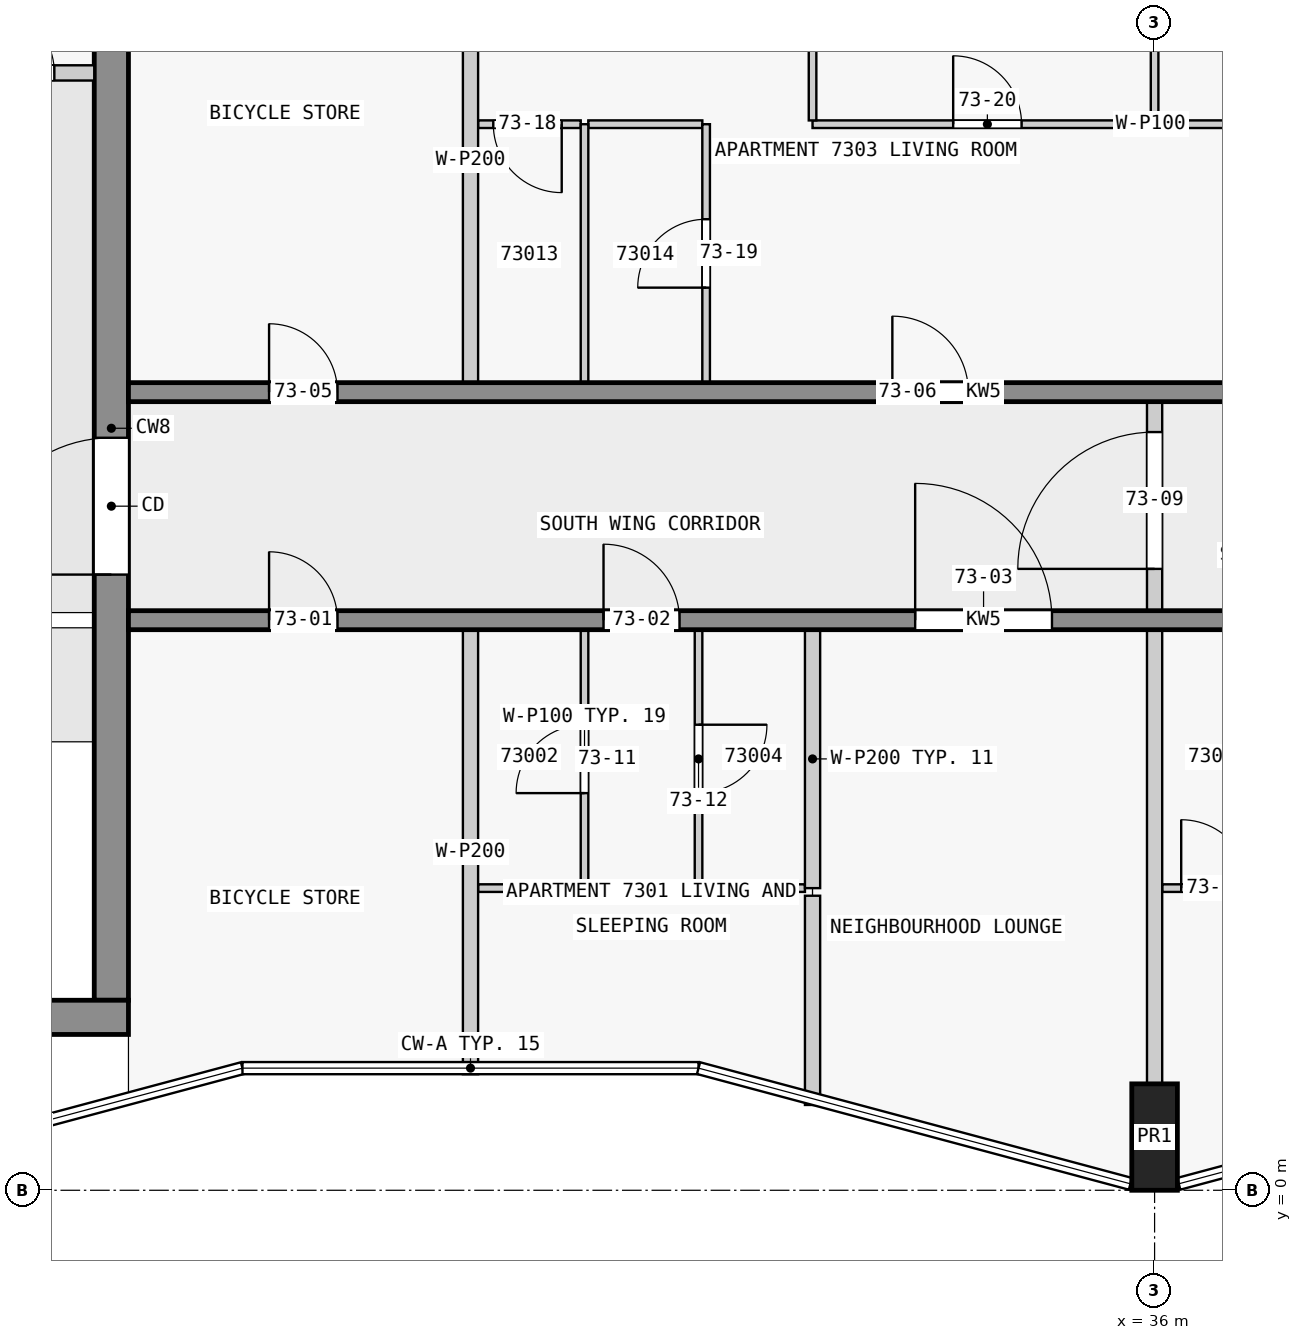
"""IFC4 building model, lengths in metres.
Left out: names, types, materials, properties, quantities, classifications, styles, units other than length and angle.
Written with IfcOpenShell. Run it as: python <this file> out.ifc"""

import sys

from ifc_helpers import new_model, si_unit, direction, frame, frame_2d, origin, origin_2d, place, context, subcontext, project, spatial, rectangle, extrude, element, fill, save


model = new_model("IFC4")
c1 = context("Model", 3, precision=1e-05, world=origin(), true_north=direction((0.0, 1.0)))
c2 = subcontext(c1, "Body", "Model", "MODEL_VIEW")
j1 = project(units=[si_unit("LENGTHUNIT", "METRE"), si_unit("PLANEANGLEUNIT", "RADIAN")], contexts=[c1])
p1 = place(None, origin())
s1 = spatial("IfcSite", under=j1, at=p1, CompositionType="ELEMENT")
p2 = place(p1, origin())
s2 = spatial("IfcBuilding", under=s1, at=p2, CompositionType="ELEMENT")
p3 = place(p2, frame((0.0, 0.0, 277.4)))
s3 = spatial("IfcBuildingStorey", under=s2, at=p3, CompositionType="ELEMENT", Elevation=277.4)
p4 = place(p3, frame((36.0, 0.7, 0.0), z_axis=(0.0, 0.0, 1.0), x_axis=(1.0, 0.0, 0.0)))
e1 = element("IfcColumn", 1, at=p4, inside=s3, PredefinedType="COLUMN", context=c2, shape_type="SweptSolid", body=[
    extrude(rectangle(XDim=0.6, YDim=1.4, at=origin_2d()), origin(), (0.0, 0.0, 1.0), 3.5),
])
p5 = place(p3, frame((1.85, 2.275, 0.0), z_axis=(0.0, 0.0, 1.0), x_axis=(1.0, 0.0, 0.0)))
e2 = element("IfcWall", 2, at=p5, inside=s3, PredefinedType="SHEAR", context=c2, shape_type="SweptSolid", body=[
    extrude(rectangle(XDim=20.65, YDim=0.45, at=frame_2d((10.325, 0.0))), origin(), (0.0, 0.0, 1.0), 3.25),
])
p6 = place(p3, frame((22.275, 2.5, 0.0), z_axis=(0.0, 0.0, 1.0), x_axis=(0.0, 1.0, 0.0)))
e3 = element("IfcWall", 3, at=p6, inside=s3, PredefinedType="SHEAR", context=c2, shape_type="SweptSolid", body=[
    extrude(rectangle(XDim=15.05, YDim=0.45, at=frame_2d((7.525, 0.0))), origin(), (0.0, 0.0, 1.0), 3.25),
])
p7 = place(p6, frame((5.6, 0.0, 0.0)))
e4 = element("IfcOpeningElement", 4, at=p7, cuts=e3, PredefinedType="OPENING", context=c2, shape_type="SweptSolid", body=[
    extrude(rectangle(XDim=1.8, YDim=2.1, at=frame_2d((0.9, 1.05))), frame((0.0, 0.235, 0.0), z_axis=(0.0, -1.0, 0.0), x_axis=(1.0, 0.0, 0.0)), (0.0, 0.0, 1.0), 0.47),
])
p8 = place(p3, frame((22.5, 7.5, 0.0), z_axis=(0.0, 0.0, 1.0), x_axis=(1.0, 0.0, 0.0)))
e5 = element("IfcWall", 5, at=p8, inside=s3, PredefinedType="SHEAR", context=c2, shape_type="SweptSolid", body=[
    extrude(rectangle(XDim=22.5, YDim=0.25, at=frame_2d((11.25, 0.0))), origin(), (0.0, 0.0, 1.0), 3.25),
])
p9 = place(p8, frame((1.85, 0.0, 0.0)))
e6 = element("IfcOpeningElement", 6, at=p9, cuts=e5, PredefinedType="OPENING", context=c2, shape_type="SweptSolid", body=[
    extrude(rectangle(XDim=0.9, YDim=2.1, at=frame_2d((0.45, 1.05))), frame((0.0, 0.135, 0.0), z_axis=(0.0, -1.0, 0.0), x_axis=(1.0, 0.0, 0.0)), (0.0, 0.0, 1.0), 0.27),
])
p10 = place(p8, frame((6.25, 0.0, 0.0)))
e7 = element("IfcOpeningElement", 7, at=p10, cuts=e5, PredefinedType="OPENING", context=c2, shape_type="SweptSolid", body=[
    extrude(rectangle(XDim=1.0, YDim=2.1, at=frame_2d((0.5, 1.05))), frame((0.0, 0.135, 0.0), z_axis=(0.0, -1.0, 0.0), x_axis=(1.0, 0.0, 0.0)), (0.0, 0.0, 1.0), 0.27),
])
p11 = place(p8, frame((10.35, 0.0, 0.0)))
e8 = element("IfcOpeningElement", 8, at=p11, cuts=e5, PredefinedType="OPENING", context=c2, shape_type="SweptSolid", body=[
    extrude(rectangle(XDim=1.8, YDim=2.1, at=frame_2d((0.9, 1.05))), frame((0.0, 0.135, 0.0), z_axis=(0.0, -1.0, 0.0), x_axis=(1.0, 0.0, 0.0)), (0.0, 0.0, 1.0), 0.27),
])
p12 = place(p8, frame((16.85, 0.0, 0.0)))
e9 = element("IfcOpeningElement", 9, at=p12, cuts=e5, PredefinedType="OPENING", context=c2, shape_type="SweptSolid", body=[
    extrude(rectangle(XDim=1.0, YDim=2.1, at=frame_2d((0.5, 1.05))), frame((0.0, 0.135, 0.0), z_axis=(0.0, -1.0, 0.0), x_axis=(1.0, 0.0, 0.0)), (0.0, 0.0, 1.0), 0.27),
])
p13 = place(p3, frame((22.5, 10.5, 0.0), z_axis=(0.0, 0.0, 1.0), x_axis=(1.0, 0.0, 0.0)))
e10 = element("IfcWall", 10, at=p13, inside=s3, PredefinedType="SHEAR", context=c2, shape_type="SweptSolid", body=[
    extrude(rectangle(XDim=22.5, YDim=0.25, at=frame_2d((11.25, 0.0))), origin(), (0.0, 0.0, 1.0), 3.25),
])
p14 = place(p13, frame((1.85, 0.0, 0.0)))
e11 = element("IfcOpeningElement", 11, at=p14, cuts=e10, PredefinedType="OPENING", context=c2, shape_type="SweptSolid", body=[
    extrude(rectangle(XDim=0.9, YDim=2.1, at=frame_2d((0.45, 1.05))), frame((0.0, 0.135, 0.0), z_axis=(0.0, -1.0, 0.0), x_axis=(1.0, 0.0, 0.0)), (0.0, 0.0, 1.0), 0.27),
])
p15 = place(p13, frame((10.05, 0.0, 0.0)))
e12 = element("IfcOpeningElement", 12, at=p15, cuts=e10, PredefinedType="OPENING", context=c2, shape_type="SweptSolid", body=[
    extrude(rectangle(XDim=1.0, YDim=2.1, at=frame_2d((0.5, 1.05))), frame((0.0, 0.135, 0.0), z_axis=(0.0, -1.0, 0.0), x_axis=(1.0, 0.0, 0.0)), (0.0, 0.0, 1.0), 0.27),
])
p16 = place(p13, frame((18.75, 0.0, 0.0)))
e13 = element("IfcOpeningElement", 13, at=p16, cuts=e10, PredefinedType="OPENING", context=c2, shape_type="SweptSolid", body=[
    extrude(rectangle(XDim=0.9, YDim=2.1, at=frame_2d((0.45, 1.05))), frame((0.0, 0.135, 0.0), z_axis=(0.0, -1.0, 0.0), x_axis=(1.0, 0.0, 0.0)), (0.0, 0.0, 1.0), 0.27),
])
p17 = place(p13, frame((20.95, 0.0, 0.0)))
e14 = element("IfcOpeningElement", 14, at=p17, cuts=e10, PredefinedType="OPENING", context=c2, shape_type="SweptSolid", body=[
    extrude(rectangle(XDim=1.0, YDim=2.1, at=frame_2d((0.5, 1.05))), frame((0.0, 0.135, 0.0), z_axis=(0.0, -1.0, 0.0), x_axis=(1.0, 0.0, 0.0)), (0.0, 0.0, 1.0), 0.27),
])
p18 = place(p3, frame((18.6, 14.7, 0.0), z_axis=(0.0, 0.0, 1.0), x_axis=(1.0, 0.0, 0.0)))
e15 = element("IfcWall", 15, at=p18, inside=s3, PredefinedType="PARTITIONING", context=c2, shape_type="SweptSolid", body=[
    extrude(rectangle(XDim=3.45, YDim=0.2, at=frame_2d((1.725, 0.0))), origin(), (0.0, 0.0, 1.0), 3.25),
])
p19 = place(p18, frame((0.3, 0.0, 0.0)))
e16 = element("IfcOpeningElement", 16, at=p19, cuts=e15, PredefinedType="OPENING", context=c2, shape_type="SweptSolid", body=[
    extrude(rectangle(XDim=0.9, YDim=2.1, at=frame_2d((0.45, 1.05))), frame((0.0, 0.11, 0.0), z_axis=(0.0, -1.0, 0.0), x_axis=(1.0, 0.0, 0.0)), (0.0, 0.0, 1.0), 0.22),
])
p20 = place(p18, frame((2.025, 0.0, 0.0)))
e17 = element("IfcOpeningElement", 17, at=p20, cuts=e15, PredefinedType="OPENING", context=c2, shape_type="SweptSolid", body=[
    extrude(rectangle(XDim=0.9, YDim=2.1, at=frame_2d((0.45, 1.05))), frame((0.0, 0.11, 0.0), z_axis=(0.0, -1.0, 0.0), x_axis=(1.0, 0.0, 0.0)), (0.0, 0.0, 1.0), 0.22),
])
for number, where, z_axis, x_axis in (
    (18, (27.1, 3.975, 0.0), (0.0, 0.0, 1.0), (1.0, 0.0, 0.0)),
    (19, (30.05, 3.975, 0.0), (0.0, 0.0, 1.0), (1.0, 0.0, 0.0)),
):
    element("IfcWall", number, at=place(p3, frame(where, z_axis=z_axis, x_axis=x_axis)), inside=s3, PredefinedType="PARTITIONING", context=c2, shape_type="SweptSolid", body=[
        extrude(rectangle(XDim=1.35, YDim=0.1, at=frame_2d((0.675, 0.0))), origin(), (0.0, 0.0, 1.0), 3.25),
    ])
p21 = place(p3, frame((36.1, 3.975, 0.0), z_axis=(0.0, 0.0, 1.0), x_axis=(1.0, 0.0, 0.0)))
e20 = element("IfcWall", 20, at=p21, inside=s3, PredefinedType="PARTITIONING", context=c2, shape_type="SweptSolid", body=[
    extrude(rectangle(XDim=1.45, YDim=0.1, at=frame_2d((0.725, 0.0))), origin(), (0.0, 0.0, 1.0), 3.25),
])
p22 = place(p21, frame((0.25, 0.0, 0.0)))
e21 = element("IfcOpeningElement", 21, at=p22, cuts=e20, PredefinedType="OPENING", context=c2, shape_type="SweptSolid", body=[
    extrude(rectangle(XDim=0.9, YDim=2.1, at=frame_2d((0.45, 1.05))), frame((0.0, 0.06, 0.0), z_axis=(0.0, -1.0, 0.0), x_axis=(1.0, 0.0, 0.0)), (0.0, 0.0, 1.0), 0.12),
])
p23 = place(p3, frame((28.45, 14.025, 0.0), z_axis=(0.0, 0.0, 1.0), x_axis=(-1.0, 0.0, 0.0)))
e22 = element("IfcWall", 22, at=p23, inside=s3, PredefinedType="PARTITIONING", context=c2, shape_type="SweptSolid", body=[
    extrude(rectangle(XDim=1.35, YDim=0.1, at=frame_2d((0.675, 0.0))), origin(), (0.0, 0.0, 1.0), 3.25),
])
p24 = place(p23, frame((0.25, 0.0, 0.0)))
e23 = element("IfcOpeningElement", 23, at=p24, cuts=e22, PredefinedType="OPENING", context=c2, shape_type="SweptSolid", body=[
    extrude(rectangle(XDim=0.9, YDim=2.1, at=frame_2d((0.45, 1.05))), frame((0.0, 0.06, 0.0), z_axis=(0.0, -1.0, 0.0), x_axis=(1.0, 0.0, 0.0)), (0.0, 0.0, 1.0), 0.12),
])
p25 = place(p3, frame((30.05, 14.025, 0.0), z_axis=(0.0, 0.0, 1.0), x_axis=(-1.0, 0.0, 0.0)))
e24 = element("IfcWall", 24, at=p25, inside=s3, PredefinedType="PARTITIONING", context=c2, shape_type="SweptSolid", body=[
    extrude(rectangle(XDim=1.5, YDim=0.1, at=frame_2d((0.75, 0.0))), origin(), (0.0, 0.0, 1.0), 3.25),
])
p26 = place(p3, frame((31.5, 14.025, 0.0), z_axis=(0.0, 0.0, 1.0), x_axis=(1.0, 0.0, 0.0)))
e25 = element("IfcWall", 25, at=p26, inside=s3, PredefinedType="PARTITIONING", context=c2, shape_type="SweptSolid", body=[
    extrude(rectangle(XDim=8.9, YDim=0.1, at=frame_2d((4.45, 0.0))), origin(), (0.0, 0.0, 1.0), 3.25),
])
p27 = place(p26, frame((1.85, 0.0, 0.0)))
e26 = element("IfcOpeningElement", 26, at=p27, cuts=e25, PredefinedType="OPENING", context=c2, shape_type="SweptSolid", body=[
    extrude(rectangle(XDim=0.9, YDim=2.1, at=frame_2d((0.45, 1.05))), frame((0.0, 0.06, 0.0), z_axis=(0.0, -1.0, 0.0), x_axis=(1.0, 0.0, 0.0)), (0.0, 0.0, 1.0), 0.12),
])
p28 = place(p26, frame((6.25, 0.0, 0.0)))
e27 = element("IfcOpeningElement", 27, at=p28, cuts=e25, PredefinedType="OPENING", context=c2, shape_type="SweptSolid", body=[
    extrude(rectangle(XDim=0.9, YDim=2.1, at=frame_2d((0.45, 1.05))), frame((0.0, 0.06, 0.0), z_axis=(0.0, -1.0, 0.0), x_axis=(1.0, 0.0, 0.0)), (0.0, 0.0, 1.0), 0.12),
])
for number, where, z_axis, x_axis in (
    (28, (27.0, 1.527, 0.0), (0.0, 0.0, 1.0), (0.0, 1.0, 0.0)),
    (29, (27.0, 10.625, 0.0), (0.0, 0.0, 1.0), (0.0, 1.0, 0.0)),
):
    element("IfcWall", number, at=place(p3, frame(where, z_axis=z_axis, x_axis=x_axis)), inside=s3, PredefinedType="PARTITIONING", context=c2, shape_type="SweptSolid", body=[
        extrude(rectangle(XDim=5.848, YDim=0.2, at=frame_2d((2.924, 0.0))), origin(), (0.0, 0.0, 1.0), 3.25),
    ])
p29 = place(p3, frame((28.5, 3.975, 0.0), z_axis=(0.0, 0.0, 1.0), x_axis=(0.0, 1.0, 0.0)))
e30 = element("IfcWall", 30, at=p29, inside=s3, PredefinedType="PARTITIONING", context=c2, shape_type="SweptSolid", body=[
    extrude(rectangle(XDim=3.4, YDim=0.1, at=frame_2d((1.7, 0.0))), origin(), (0.0, 0.0, 1.0), 3.25),
])
p30 = place(p29, frame((1.25, 0.0, 0.0)))
e31 = element("IfcOpeningElement", 31, at=p30, cuts=e30, PredefinedType="OPENING", context=c2, shape_type="SweptSolid", body=[
    extrude(rectangle(XDim=0.9, YDim=2.1, at=frame_2d((0.45, 1.05))), frame((0.0, 0.06, 0.0), z_axis=(0.0, -1.0, 0.0), x_axis=(1.0, 0.0, 0.0)), (0.0, 0.0, 1.0), 0.12),
])
p31 = place(p3, frame((28.5, 10.625, 0.0), z_axis=(0.0, 0.0, 1.0), x_axis=(0.0, 1.0, 0.0)))
e32 = element("IfcWall", 32, at=p31, inside=s3, PredefinedType="PARTITIONING", context=c2, shape_type="SweptSolid", body=[
    extrude(rectangle(XDim=3.4, YDim=0.1, at=frame_2d((1.7, 0.0))), origin(), (0.0, 0.0, 1.0), 3.25),
])
p32 = place(p3, frame((30.0, 7.375, 0.0), z_axis=(0.0, 0.0, 1.0), x_axis=(0.0, -1.0, 0.0)))
e33 = element("IfcWall", 33, at=p32, inside=s3, PredefinedType="PARTITIONING", context=c2, shape_type="SweptSolid", body=[
    extrude(rectangle(XDim=3.4, YDim=0.1, at=frame_2d((1.7, 0.0))), origin(), (0.0, 0.0, 1.0), 3.25),
])
p33 = place(p32, frame((1.25, 0.0, 0.0)))
e34 = element("IfcOpeningElement", 34, at=p33, cuts=e33, PredefinedType="OPENING", context=c2, shape_type="SweptSolid", body=[
    extrude(rectangle(XDim=0.9, YDim=2.1, at=frame_2d((0.45, 1.05))), frame((0.0, 0.06, 0.0), z_axis=(0.0, -1.0, 0.0), x_axis=(1.0, 0.0, 0.0)), (0.0, 0.0, 1.0), 0.12),
])
p34 = place(p3, frame((30.1, 10.625, 0.0), z_axis=(0.0, 0.0, 1.0), x_axis=(0.0, 1.0, 0.0)))
e35 = element("IfcWall", 35, at=p34, inside=s3, PredefinedType="PARTITIONING", context=c2, shape_type="SweptSolid", body=[
    extrude(rectangle(XDim=3.4, YDim=0.1, at=frame_2d((1.7, 0.0))), origin(), (0.0, 0.0, 1.0), 3.25),
])
p35 = place(p34, frame((1.25, 0.0, 0.0)))
e36 = element("IfcOpeningElement", 36, at=p35, cuts=e35, PredefinedType="OPENING", context=c2, shape_type="SweptSolid", body=[
    extrude(rectangle(XDim=0.9, YDim=2.1, at=frame_2d((0.45, 1.05))), frame((0.0, 0.06, 0.0), z_axis=(0.0, -1.0, 0.0), x_axis=(1.0, 0.0, 0.0)), (0.0, 0.0, 1.0), 0.12),
])
p36 = place(p3, frame((31.5, 16.878, 0.0), z_axis=(0.0, 0.0, 1.0), x_axis=(0.0, -1.0, 0.0)))
e37 = element("IfcWall", 37, at=p36, inside=s3, PredefinedType="PARTITIONING", context=c2, shape_type="SweptSolid", body=[
    extrude(rectangle(XDim=2.803, YDim=0.1, at=frame_2d((1.401, 0.0))), origin(), (0.0, 0.0, 1.0), 3.25),
])
p37 = place(p3, frame((31.5, 3.875, 0.0), z_axis=(0.0, 0.0, 1.0), x_axis=(0.0, -1.0, 0.0)))
e38 = element("IfcWall", 38, at=p37, inside=s3, PredefinedType="PARTITIONING", context=c2, shape_type="SweptSolid", body=[
    extrude(rectangle(XDim=2.753, YDim=0.2, at=frame_2d((1.376, 0.0))), origin(), (0.0, 0.0, 1.0), 3.25),
])
p38 = place(p3, frame((31.5, 3.975, 0.0), z_axis=(0.0, 0.0, 1.0), x_axis=(0.0, 1.0, 0.0)))
e39 = element("IfcWall", 39, at=p38, inside=s3, PredefinedType="PARTITIONING", context=c2, shape_type="SweptSolid", body=[
    extrude(rectangle(XDim=3.4, YDim=0.2, at=frame_2d((1.7, 0.0))), origin(), (0.0, 0.0, 1.0), 3.25),
])
p39 = place(p3, frame((36.0, 14.075, 0.0), z_axis=(0.0, 0.0, 1.0), x_axis=(0.0, 1.0, 0.0)))
e40 = element("IfcWall", 40, at=p39, inside=s3, PredefinedType="PARTITIONING", context=c2, shape_type="SweptSolid", body=[
    extrude(rectangle(XDim=2.525, YDim=0.1, at=frame_2d((1.263, 0.0))), origin(), (0.0, 0.0, 1.0), 3.25),
])
p40 = place(p3, frame((36.0, 1.4, 0.0), z_axis=(0.0, 0.0, 1.0), x_axis=(0.0, 1.0, 0.0)))
e41 = element("IfcWall", 41, at=p40, inside=s3, PredefinedType="PARTITIONING", context=c2, shape_type="SweptSolid", body=[
    extrude(rectangle(XDim=5.975, YDim=0.2, at=frame_2d((2.988, 0.0))), origin(), (0.0, 0.0, 1.0), 3.25),
])
p41 = place(p3, frame((36.0, 7.475, 0.0), z_axis=(0.0, 0.0, 1.0), x_axis=(0.0, 1.0, 0.0)))
e42 = element("IfcWall", 42, at=p41, inside=s3, PredefinedType="PARTITIONING", context=c2, shape_type="SweptSolid", body=[
    extrude(rectangle(XDim=3.15, YDim=0.2, at=frame_2d((1.575, 0.0))), origin(), (0.0, 0.0, 1.0), 3.25),
])
p42 = place(p41, frame((0.7, 0.0, 0.0)))
e43 = element("IfcOpeningElement", 43, at=p42, cuts=e42, PredefinedType="OPENING", context=c2, shape_type="SweptSolid", body=[
    extrude(rectangle(XDim=1.8, YDim=2.1, at=frame_2d((0.9, 1.05))), frame((0.0, 0.11, 0.0), z_axis=(0.0, -1.0, 0.0), x_axis=(1.0, 0.0, 0.0)), (0.0, 0.0, 1.0), 0.22),
])
p43 = place(p7, origin())
e44 = element("IfcDoor", 44, at=p43, inside=s3, OperationType="DOUBLE_DOOR_SINGLE_SWING", PredefinedType="DOOR", context=c2, shape_type="SweptSolid", body=[
    extrude(rectangle(XDim=1.8, YDim=2.1, at=frame_2d((0.9, 1.05))), frame((0.0, 0.025, 0.0), z_axis=(0.0, -1.0, 0.0), x_axis=(1.0, 0.0, 0.0)), (0.0, 0.0, 1.0), 0.05),
])
fill(e4, e44)
p44 = place(p20, origin())
e45 = element("IfcDoor", 45, at=p44, inside=s3, OperationType="SINGLE_SWING_LEFT", PredefinedType="DOOR", context=c2, shape_type="SweptSolid", body=[
    extrude(rectangle(XDim=0.9, YDim=2.1, at=frame_2d((0.45, 1.05))), frame((0.0, 0.025, 0.0), z_axis=(0.0, -1.0, 0.0), x_axis=(1.0, 0.0, 0.0)), (0.0, 0.0, 1.0), 0.05),
])
fill(e17, e45)
p45 = place(p9, origin())
e46 = element("IfcDoor", 46, at=p45, inside=s3, OperationType="SINGLE_SWING_LEFT", PredefinedType="DOOR", context=c2, shape_type="SweptSolid", body=[
    extrude(rectangle(XDim=0.9, YDim=2.1, at=frame_2d((0.45, 1.05))), frame((0.0, 0.025, 0.0), z_axis=(0.0, -1.0, 0.0), x_axis=(1.0, 0.0, 0.0)), (0.0, 0.0, 1.0), 0.05),
])
fill(e6, e46)
p46 = place(p10, origin())
e47 = element("IfcDoor", 47, at=p46, inside=s3, OperationType="SINGLE_SWING_LEFT", PredefinedType="DOOR", context=c2, shape_type="SweptSolid", body=[
    extrude(rectangle(XDim=1.0, YDim=2.1, at=frame_2d((0.5, 1.05))), frame((0.0, 0.025, 0.0), z_axis=(0.0, -1.0, 0.0), x_axis=(1.0, 0.0, 0.0)), (0.0, 0.0, 1.0), 0.05),
])
fill(e7, e47)
p47 = place(p11, origin())
e48 = element("IfcDoor", 48, at=p47, inside=s3, OperationType="SINGLE_SWING_LEFT", PredefinedType="DOOR", context=c2, shape_type="SweptSolid", body=[
    extrude(rectangle(XDim=1.8, YDim=2.1, at=frame_2d((0.9, 1.05))), frame((0.0, 0.025, 0.0), z_axis=(0.0, -1.0, 0.0), x_axis=(1.0, 0.0, 0.0)), (0.0, 0.0, 1.0), 0.05),
])
fill(e8, e48)
p48 = place(p14, origin())
e49 = element("IfcDoor", 49, at=p48, inside=s3, OperationType="SINGLE_SWING_LEFT", PredefinedType="DOOR", context=c2, shape_type="SweptSolid", body=[
    extrude(rectangle(XDim=0.9, YDim=2.1, at=frame_2d((0.45, 1.05))), frame((0.0, 0.025, 0.0), z_axis=(0.0, -1.0, 0.0), x_axis=(1.0, 0.0, 0.0)), (0.0, 0.0, 1.0), 0.05),
])
fill(e11, e49)
p49 = place(p15, origin())
e50 = element("IfcDoor", 50, at=p49, inside=s3, OperationType="SINGLE_SWING_LEFT", PredefinedType="DOOR", context=c2, shape_type="SweptSolid", body=[
    extrude(rectangle(XDim=1.0, YDim=2.1, at=frame_2d((0.5, 1.05))), frame((0.0, 0.025, 0.0), z_axis=(0.0, -1.0, 0.0), x_axis=(1.0, 0.0, 0.0)), (0.0, 0.0, 1.0), 0.05),
])
fill(e12, e50)
p50 = place(p42, origin())
e51 = element("IfcDoor", 51, at=p50, inside=s3, OperationType="SINGLE_SWING_RIGHT", PredefinedType="DOOR", context=c2, shape_type="SweptSolid", body=[
    extrude(rectangle(XDim=1.8, YDim=2.1, at=frame_2d((0.9, 1.05))), frame((0.0, 0.025, 0.0), z_axis=(0.0, -1.0, 0.0), x_axis=(1.0, 0.0, 0.0)), (0.0, 0.0, 1.0), 0.05),
])
fill(e43, e51)
p51 = place(p30, origin())
e52 = element("IfcDoor", 52, at=p51, inside=s3, OperationType="SINGLE_SWING_LEFT", PredefinedType="DOOR", context=c2, shape_type="SweptSolid", body=[
    extrude(rectangle(XDim=0.9, YDim=2.1, at=frame_2d((0.45, 1.05))), frame((0.0, 0.025, 0.0), z_axis=(0.0, -1.0, 0.0), x_axis=(1.0, 0.0, 0.0)), (0.0, 0.0, 1.0), 0.05),
])
fill(e31, e52)
p52 = place(p33, origin())
e53 = element("IfcDoor", 53, at=p52, inside=s3, OperationType="SINGLE_SWING_LEFT", PredefinedType="DOOR", context=c2, shape_type="SweptSolid", body=[
    extrude(rectangle(XDim=0.9, YDim=2.1, at=frame_2d((0.45, 1.05))), frame((0.0, 0.025, 0.0), z_axis=(0.0, -1.0, 0.0), x_axis=(1.0, 0.0, 0.0)), (0.0, 0.0, 1.0), 0.05),
])
fill(e34, e53)
p53 = place(p22, origin())
e54 = element("IfcDoor", 54, at=p53, inside=s3, OperationType="SINGLE_SWING_LEFT", PredefinedType="DOOR", context=c2, shape_type="SweptSolid", body=[
    extrude(rectangle(XDim=0.9, YDim=2.1, at=frame_2d((0.45, 1.05))), frame((0.0, 0.025, 0.0), z_axis=(0.0, -1.0, 0.0), x_axis=(1.0, 0.0, 0.0)), (0.0, 0.0, 1.0), 0.05),
])
fill(e21, e54)
p54 = place(p24, origin())
e55 = element("IfcDoor", 55, at=p54, inside=s3, OperationType="SINGLE_SWING_RIGHT", PredefinedType="DOOR", context=c2, shape_type="SweptSolid", body=[
    extrude(rectangle(XDim=0.9, YDim=2.1, at=frame_2d((0.45, 1.05))), frame((0.0, 0.025, 0.0), z_axis=(0.0, -1.0, 0.0), x_axis=(1.0, 0.0, 0.0)), (0.0, 0.0, 1.0), 0.05),
])
fill(e23, e55)
p55 = place(p35, origin())
e56 = element("IfcDoor", 56, at=p55, inside=s3, OperationType="SINGLE_SWING_LEFT", PredefinedType="DOOR", context=c2, shape_type="SweptSolid", body=[
    extrude(rectangle(XDim=0.9, YDim=2.1, at=frame_2d((0.45, 1.05))), frame((0.0, 0.025, 0.0), z_axis=(0.0, -1.0, 0.0), x_axis=(1.0, 0.0, 0.0)), (0.0, 0.0, 1.0), 0.05),
])
fill(e36, e56)
p56 = place(p27, origin())
e57 = element("IfcDoor", 57, at=p56, inside=s3, OperationType="SINGLE_SWING_LEFT", PredefinedType="DOOR", context=c2, shape_type="SweptSolid", body=[
    extrude(rectangle(XDim=0.9, YDim=2.1, at=frame_2d((0.45, 1.05))), frame((0.0, 0.025, 0.0), z_axis=(0.0, -1.0, 0.0), x_axis=(1.0, 0.0, 0.0)), (0.0, 0.0, 1.0), 0.05),
])
fill(e26, e57)
save(model, sys.argv[1])
